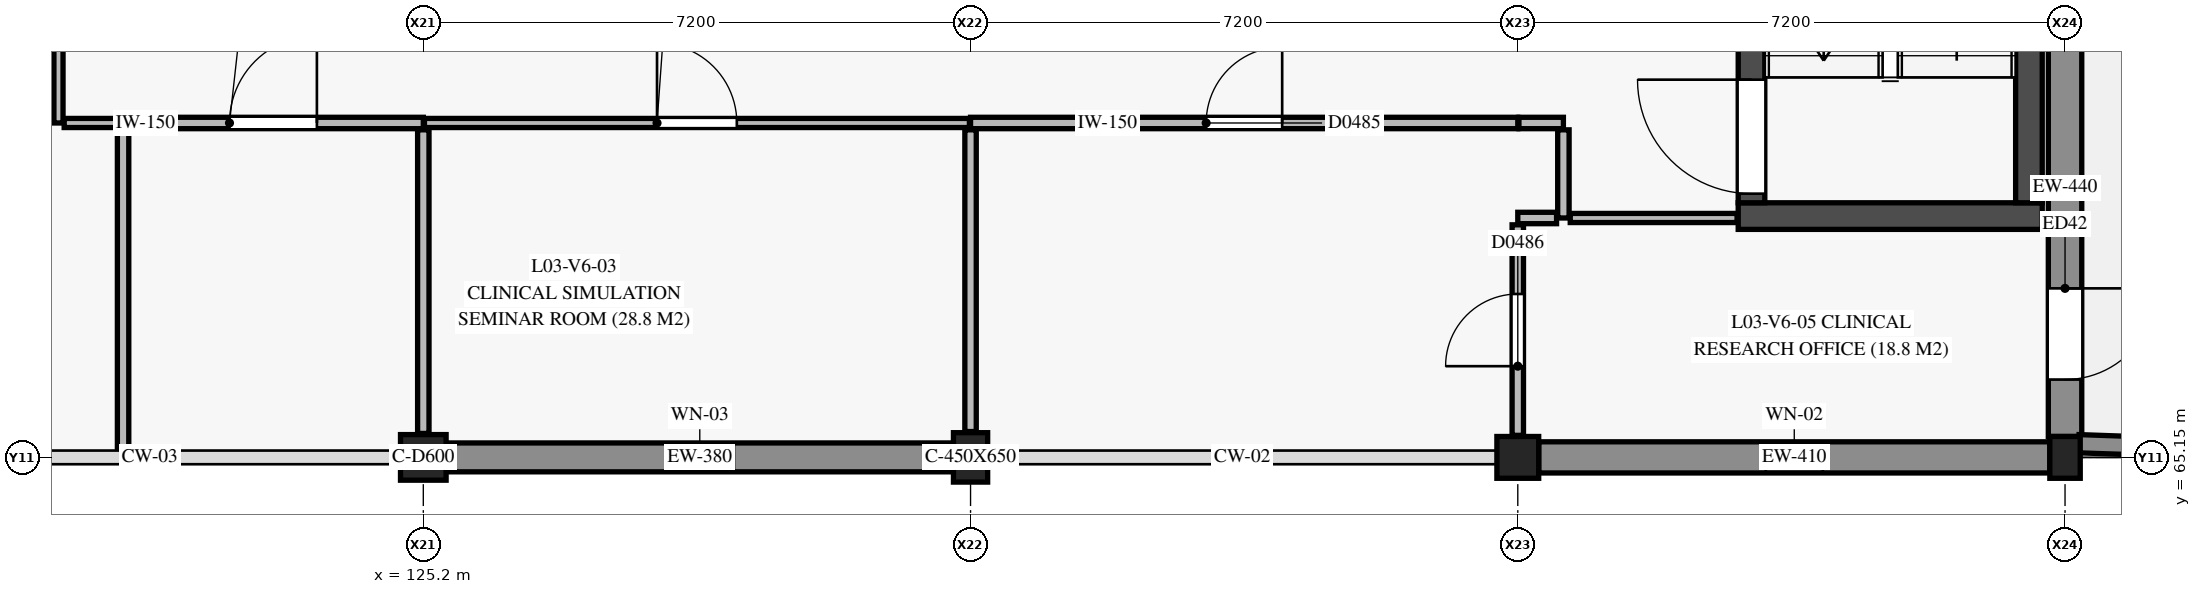
"""IFC4 building model, lengths in metres.
Left out: names, types, materials, properties, quantities, classifications, styles, units other than length and angle.
Written with IfcOpenShell. Run it as: python <this file> out.ifc"""

import sys

from ifc_helpers import new_model, si_unit, direction, frame, frame_2d, origin, origin_2d, place, context, subcontext, project, spatial, rectangle, circle, extrude, element, fill, save


model = new_model("IFC4")
c1 = context("Model", 3, precision=1e-05, world=origin(), true_north=direction((0.0, 1.0)))
c2 = subcontext(c1, "Body", "Model", "MODEL_VIEW")
j1 = project(units=[si_unit("LENGTHUNIT", "METRE"), si_unit("PLANEANGLEUNIT", "RADIAN")], contexts=[c1])
p1 = place(None, origin())
s1 = spatial("IfcSite", under=j1, at=p1, CompositionType="ELEMENT")
p2 = place(p1, origin())
s2 = spatial("IfcBuilding", under=s1, at=p2, CompositionType="ELEMENT")
p3 = place(p2, frame((0.0, 0.0, 13.2)))
s3 = spatial("IfcBuildingStorey", under=s2, at=p3, CompositionType="ELEMENT", Elevation=13.2)
p4 = place(p3, frame((125.2, 65.15, 0.0), z_axis=(0.0, 0.0, 1.0), x_axis=(1.0, 0.0, 0.0)))
e1 = element("IfcColumn", 1, at=p4, inside=s3, PredefinedType="COLUMN", context=c2, shape_type="SweptSolid", body=[
    extrude(circle(Radius=0.3, at=origin_2d()), origin(), (0.0, 0.0, 1.0), 4.05),
])
p5 = place(p3, frame((132.4, 65.15, 0.0), z_axis=(0.0, 0.0, 1.0), x_axis=(1.0, 0.0, 0.0)))
e2 = element("IfcColumn", 2, at=p5, inside=s3, PredefinedType="COLUMN", context=c2, shape_type="SweptSolid", body=[
    extrude(rectangle(XDim=0.45, YDim=0.65, at=origin_2d()), origin(), (0.0, 0.0, 1.0), 4.05),
])
p6 = place(p3, frame((139.6, 65.15, 0.0), z_axis=(0.0, 0.0, 1.0), x_axis=(1.0, 0.0, 0.0)))
e3 = element("IfcColumn", 3, at=p6, inside=s3, PredefinedType="COLUMN", context=c2, shape_type="SweptSolid", body=[
    extrude(rectangle(XDim=0.55, YDim=0.55, at=origin_2d()), origin(), (0.0, 0.0, 1.0), 4.05),
])
p7 = place(p3, frame((146.8, 65.15, 0.0), z_axis=(0.0, 0.0, 1.0), x_axis=(1.0, 0.0, 0.0)))
e4 = element("IfcColumn", 4, at=p7, inside=s3, PredefinedType="COLUMN", context=c2, shape_type="SweptSolid", body=[
    extrude(rectangle(XDim=0.4, YDim=0.55, at=origin_2d()), origin(), (0.0, 0.0, 1.0), 4.05),
])
p8 = place(p3, frame((142.5, 68.325, 0.0), z_axis=(0.0, 0.0, 1.0), x_axis=(1.0, 0.0, 0.0)))
e5 = element("IfcWall", 5, at=p8, inside=s3, PredefinedType="SHEAR", context=c2, shape_type="SweptSolid", body=[
    extrude(rectangle(XDim=4.0, YDim=0.35, at=frame_2d((2.0, 0.0))), origin(), (0.0, 0.0, 1.0), 3.95),
])
p9 = place(p3, frame((142.675, 68.5, 0.0), z_axis=(0.0, 0.0, 1.0), x_axis=(0.0, 1.0, 0.0)))
e6 = element("IfcWall", 6, at=p9, inside=s3, PredefinedType="SHEAR", context=c2, shape_type="SweptSolid", body=[
    extrude(rectangle(XDim=7.3, YDim=0.35, at=frame_2d((3.65, 0.0))), origin(), (0.0, 0.0, 1.0), 3.95),
])
p10 = place(p9, frame((0.12, 0.0, 0.0)))
e7 = element("IfcOpeningElement", 7, at=p10, cuts=e6, PredefinedType="OPENING", context=c2, shape_type="SweptSolid", body=[
    extrude(rectangle(XDim=1.5, YDim=2.15, at=frame_2d((0.75, 1.075))), frame((0.0, 0.185, 0.0), z_axis=(0.0, -1.0, 0.0), x_axis=(1.0, 0.0, 0.0)), (0.0, 0.0, 1.0), 0.37),
])
p11 = place(p3, frame((146.325, 68.5, 0.0), z_axis=(0.0, 0.0, 1.0), x_axis=(0.0, 1.0, 0.0)))
e8 = element("IfcWall", 8, at=p11, inside=s3, PredefinedType="SHEAR", context=c2, shape_type="SweptSolid", body=[
    extrude(rectangle(XDim=7.3, YDim=0.35, at=frame_2d((3.65, 0.0))), origin(), (0.0, 0.0, 1.0), 3.95),
])
p12 = place(p3, frame((146.6, 65.15, 0.0), z_axis=(0.0, 0.0, 1.0), x_axis=(-1.0, 0.0, 0.0)))
e9 = element("IfcWall", 9, at=p12, inside=s3, PredefinedType="USERDEFINED", context=c2, shape_type="SweptSolid", body=[
    extrude(rectangle(XDim=6.725, YDim=0.41, at=frame_2d((3.363, 0.0))), origin(), (0.0, 0.0, 1.0), 3.13),
])
p13 = place(p12, frame((2.988, 0.0, 0.9)))
e10 = element("IfcOpeningElement", 10, at=p13, cuts=e9, PredefinedType="OPENING", context=c2, shape_type="SweptSolid", body=[
    extrude(rectangle(XDim=0.75, YDim=1.8, at=frame_2d((0.375, 0.9))), frame((0.0, 0.215, 0.0), z_axis=(0.0, -1.0, 0.0), x_axis=(1.0, 0.0, 0.0)), (0.0, 0.0, 1.0), 0.43),
])
p14 = place(p3, frame((132.175, 65.15, 0.0), z_axis=(0.0, 0.0, 1.0), x_axis=(-1.0, 0.0, 0.0)))
e11 = element("IfcWall", 11, at=p14, inside=s3, PredefinedType="USERDEFINED", context=c2, shape_type="SweptSolid", body=[
    extrude(rectangle(XDim=6.675, YDim=0.38, at=frame_2d((3.337, 0.0))), origin(), (0.0, 0.0, 1.0), 3.13),
])
p15 = place(p14, frame((2.887, 0.0, 0.9)))
e12 = element("IfcOpeningElement", 12, at=p15, cuts=e11, PredefinedType="OPENING", context=c2, shape_type="SweptSolid", body=[
    extrude(rectangle(XDim=0.9, YDim=1.8, at=frame_2d((0.45, 0.9))), frame((0.0, 0.2, 0.0), z_axis=(0.0, -1.0, 0.0), x_axis=(1.0, 0.0, 0.0)), (0.0, 0.0, 1.0), 0.4),
])
p16 = place(p3, frame((146.8, 71.975, 0.0), z_axis=(0.0, 0.0, 1.0), x_axis=(0.0, -1.0, 0.0)))
e13 = element("IfcWall", 13, at=p16, inside=s3, PredefinedType="USERDEFINED", context=c2, shape_type="SweptSolid", body=[
    extrude(rectangle(XDim=6.55, YDim=0.44, at=frame_2d((3.275, 0.0))), origin(), (0.0, 0.0, 1.0), 3.13),
])
p17 = place(p16, frame((4.601, 0.0, 0.0)))
e14 = element("IfcOpeningElement", 14, at=p17, cuts=e13, PredefinedType="OPENING", context=c2, shape_type="SweptSolid", body=[
    extrude(rectangle(XDim=1.2, YDim=2.2, at=frame_2d((0.6, 1.1))), frame((0.0, 0.23, 0.0), z_axis=(0.0, -1.0, 0.0), x_axis=(1.0, 0.0, 0.0)), (0.0, 0.0, 1.0), 0.46),
])
p18 = place(p3, frame((146.98, 65.33, 0.0), z_axis=(0.0, 0.0, 1.0), x_axis=(0.999385059583, -0.035064265038, 0.0)))
e15 = element("IfcWall", 15, at=p18, inside=s3, PredefinedType="PARAPET", context=c2, shape_type="SweptSolid", body=[
    extrude(rectangle(XDim=6.844, YDim=0.24, at=frame_2d((3.422, 0.0))), origin(), (0.0, 0.0, 1.0), 1.12),
])
p19 = place(p3, frame((121.25, 69.55, 0.0), z_axis=(0.0, 0.0, 1.0), x_axis=(1.0, 0.0, 0.0)))
e16 = element("IfcWall", 16, at=p19, inside=s3, PredefinedType="PARTITIONING", context=c2, shape_type="SweptSolid", body=[
    extrude(rectangle(XDim=3.95, YDim=0.15, at=frame_2d((1.975, 0.0))), origin(), (0.0, 0.0, 1.0), 3.135),
])
p20 = place(p19, frame((1.4, 0.0, 0.0)))
e17 = element("IfcOpeningElement", 17, at=p20, cuts=e16, PredefinedType="OPENING", context=c2, shape_type="SweptSolid", body=[
    extrude(rectangle(XDim=1.15, YDim=2.15, at=frame_2d((0.575, 1.075))), frame((0.0, 0.085, 0.0), z_axis=(0.0, -1.0, 0.0), x_axis=(1.0, 0.0, 0.0)), (0.0, 0.0, 1.0), 0.17),
])
p21 = place(p3, frame((132.4, 69.55, 0.0), z_axis=(0.0, 0.0, 1.0), x_axis=(1.0, 0.0, 0.0)))
e18 = element("IfcWall", 18, at=p21, inside=s3, PredefinedType="PARTITIONING", context=c2, shape_type="SweptSolid", body=[
    extrude(rectangle(XDim=7.2, YDim=0.15, at=frame_2d((3.6, 0.0))), origin(), (0.0, 0.0, 1.0), 3.235),
])
p22 = place(p21, frame((3.1, 0.0, 0.0)))
e19 = element("IfcOpeningElement", 19, at=p22, cuts=e18, PredefinedType="OPENING", context=c2, shape_type="SweptSolid", body=[
    extrude(rectangle(XDim=1.0, YDim=2.15, at=frame_2d((0.5, 1.075))), frame((0.0, 0.085, 0.0), z_axis=(0.0, -1.0, 0.0), x_axis=(1.0, 0.0, 0.0)), (0.0, 0.0, 1.0), 0.17),
])
p23 = place(p3, frame((139.615, 69.55, 0.0), z_axis=(0.0, 0.0, 1.0), x_axis=(1.0, 0.0, 0.0)))
e20 = element("IfcWall", 20, at=p23, inside=s3, PredefinedType="PARTITIONING", context=c2, shape_type="SweptSolid", body=[
    extrude(rectangle(XDim=0.585, YDim=0.15, at=frame_2d((0.292, 0.0))), origin(), (0.0, 0.0, 1.0), 3.235),
])
p24 = place(p3, frame((140.2, 68.3, 0.0), z_axis=(0.0, 0.0, 1.0), x_axis=(0.0, 1.0, 0.0)))
e21 = element("IfcWall", 21, at=p24, inside=s3, PredefinedType="PARTITIONING", context=c2, shape_type="SweptSolid", body=[
    extrude(rectangle(XDim=1.16, YDim=0.15, at=frame_2d((0.58, 0.0))), origin(), (0.0, 0.0, 1.0), 3.95),
])
p25 = place(p3, frame((139.6, 68.3, 0.0), z_axis=(0.0, 0.0, 1.0), x_axis=(1.0, 0.0, 0.0)))
e22 = element("IfcWall", 22, at=p25, inside=s3, PredefinedType="PARTITIONING", context=c2, shape_type="SweptSolid", body=[
    extrude(rectangle(XDim=0.51, YDim=0.15, at=frame_2d((0.255, 0.0))), origin(), (0.0, 0.0, 1.0), 3.235),
])
p26 = place(p3, frame((120.4, 69.55, 0.0), z_axis=(0.0, 0.0, 1.0), x_axis=(0.0, 1.0, 0.0)))
e23 = element("IfcWall", 23, at=p26, inside=s3, PredefinedType="PARTITIONING", context=c2, shape_type="SweptSolid", body=[
    extrude(rectangle(XDim=17.535, YDim=0.12, at=frame_2d((8.768, 0.0))), origin(), (0.0, 0.0, 1.0), 3.285),
])
p27 = place(p26, frame((8.143, 0.0, 0.0)))
e24 = element("IfcOpeningElement", 24, at=p27, cuts=e23, PredefinedType="OPENING", context=c2, shape_type="SweptSolid", body=[
    extrude(rectangle(XDim=1.25, YDim=2.15, at=frame_2d((0.625, 1.075))), frame((0.0, 0.07, 0.0), z_axis=(0.0, -1.0, 0.0), x_axis=(1.0, 0.0, 0.0)), (0.0, 0.0, 1.0), 0.14),
])
p28 = place(p3, frame((120.475, 69.55, 0.0), z_axis=(0.0, 0.0, 1.0), x_axis=(1.0, 0.0, 0.0)))
e25 = element("IfcWall", 25, at=p28, inside=s3, PredefinedType="PARTITIONING", context=c2, shape_type="SweptSolid", body=[
    extrude(rectangle(XDim=0.76, YDim=0.12, at=frame_2d((0.38, 0.0))), origin(), (0.0, 0.0, 1.0), 3.95),
])
p29 = place(p3, frame((125.215, 69.55, 0.0), z_axis=(0.0, 0.0, 1.0), x_axis=(1.0, 0.0, 0.0)))
e26 = element("IfcWall", 26, at=p29, inside=s3, PredefinedType="PARTITIONING", context=c2, shape_type="SweptSolid", body=[
    extrude(rectangle(XDim=7.17, YDim=0.12, at=frame_2d((3.585, 0.0))), origin(), (0.0, 0.0, 1.0), 3.135),
])
p30 = place(p29, frame((3.06, 0.0, 0.0)))
e27 = element("IfcOpeningElement", 27, at=p30, cuts=e26, PredefinedType="OPENING", context=c2, shape_type="SweptSolid", body=[
    extrude(rectangle(XDim=1.05, YDim=2.15, at=frame_2d((0.525, 1.075))), frame((0.0, 0.07, 0.0), z_axis=(0.0, -1.0, 0.0), x_axis=(1.0, 0.0, 0.0)), (0.0, 0.0, 1.0), 0.14),
])
p31 = place(p3, frame((140.29, 68.3, 0.0), z_axis=(0.0, 0.0, 1.0), x_axis=(1.0, 0.0, 0.0)))
e28 = element("IfcWall", 28, at=p31, inside=s3, PredefinedType="PARTITIONING", context=c2, shape_type="SweptSolid", body=[
    extrude(rectangle(XDim=2.195, YDim=0.12, at=frame_2d((1.098, 0.0))), origin(), (0.0, 0.0, 1.0), 3.95),
])
p32 = place(p3, frame((121.25, 65.255, 0.0), z_axis=(0.0, 0.0, 1.0), x_axis=(0.0, 1.0, 0.0)))
e29 = element("IfcWall", 29, at=p32, inside=s3, PredefinedType="PARTITIONING", context=c2, shape_type="SweptSolid", body=[
    extrude(rectangle(XDim=4.205, YDim=0.15, at=frame_2d((2.103, 0.0))), origin(), (0.0, 0.0, 1.0), 3.515),
])
p33 = place(p3, frame((125.2, 65.465, 0.0), z_axis=(0.0, 0.0, 1.0), x_axis=(0.0, 1.0, 0.0)))
e30 = element("IfcWall", 30, at=p33, inside=s3, PredefinedType="PARTITIONING", context=c2, shape_type="SweptSolid", body=[
    extrude(rectangle(XDim=3.995, YDim=0.15, at=frame_2d((1.998, 0.0))), origin(), (0.0, 0.0, 1.0), 3.135),
])
p34 = place(p3, frame((132.4, 65.49, 0.0), z_axis=(0.0, 0.0, 1.0), x_axis=(0.0, 1.0, 0.0)))
e31 = element("IfcWall", 31, at=p34, inside=s3, PredefinedType="PARTITIONING", context=c2, shape_type="SweptSolid", body=[
    extrude(rectangle(XDim=3.97, YDim=0.15, at=frame_2d((1.985, 0.0))), origin(), (0.0, 0.0, 1.0), 3.355),
])
p35 = place(p3, frame((139.6, 65.44, 0.0), z_axis=(0.0, 0.0, 1.0), x_axis=(0.0, 1.0, 0.0)))
e32 = element("IfcWall", 32, at=p35, inside=s3, PredefinedType="PARTITIONING", context=c2, shape_type="SweptSolid", body=[
    extrude(rectangle(XDim=2.77, YDim=0.15, at=frame_2d((1.385, 0.0))), origin(), (0.0, 0.0, 1.0), 3.235),
])
p36 = place(p35, frame((0.91, 0.0, 0.0)))
e33 = element("IfcOpeningElement", 33, at=p36, cuts=e32, PredefinedType="OPENING", context=c2, shape_type="SweptSolid", body=[
    extrude(rectangle(XDim=0.95, YDim=2.1, at=frame_2d((0.475, 1.05))), frame((0.0, 0.085, 0.0), z_axis=(0.0, -1.0, 0.0), x_axis=(1.0, 0.0, 0.0)), (0.0, 0.0, 1.0), 0.17),
])
p37 = place(p13, origin())
e34 = element("IfcWindow", 34, at=p37, inside=s3, PartitioningType="SINGLE_PANEL", PredefinedType="WINDOW", context=c2, shape_type="SweptSolid", body=[
    extrude(rectangle(XDim=0.75, YDim=1.8, at=frame_2d((0.375, 0.9))), frame((0.0, 0.03, 0.0), z_axis=(0.0, -1.0, 0.0), x_axis=(1.0, 0.0, 0.0)), (0.0, 0.0, 1.0), 0.06),
])
fill(e10, e34)
p38 = place(p15, origin())
e35 = element("IfcWindow", 35, at=p38, inside=s3, PartitioningType="SINGLE_PANEL", PredefinedType="WINDOW", context=c2, shape_type="SweptSolid", body=[
    extrude(rectangle(XDim=0.9, YDim=1.8, at=frame_2d((0.45, 0.9))), frame((0.0, 0.03, 0.0), z_axis=(0.0, -1.0, 0.0), x_axis=(1.0, 0.0, 0.0)), (0.0, 0.0, 1.0), 0.06),
])
fill(e12, e35)
p39 = place(p17, origin())
e36 = element("IfcDoor", 36, at=p39, inside=s3, OperationType="SINGLE_SWING_LEFT", PredefinedType="DOOR", context=c2, shape_type="SweptSolid", body=[
    extrude(rectangle(XDim=1.2, YDim=2.2, at=frame_2d((0.6, 1.1))), frame((0.0, 0.025, 0.0), z_axis=(0.0, -1.0, 0.0), x_axis=(1.0, 0.0, 0.0)), (0.0, 0.0, 1.0), 0.05),
])
fill(e14, e36)
p40 = place(p10, origin())
e37 = element("IfcDoor", 37, at=p40, inside=s3, OperationType="SINGLE_SWING_RIGHT", PredefinedType="DOOR", context=c2, shape_type="SweptSolid", body=[
    extrude(rectangle(XDim=1.5, YDim=2.15, at=frame_2d((0.75, 1.075))), frame((0.0, 0.025, 0.0), z_axis=(0.0, -1.0, 0.0), x_axis=(1.0, 0.0, 0.0)), (0.0, 0.0, 1.0), 0.05),
])
fill(e7, e37)
p41 = place(p20, origin())
e38 = element("IfcDoor", 38, at=p41, inside=s3, OperationType="SINGLE_SWING_RIGHT", PredefinedType="DOOR", context=c2, shape_type="SweptSolid", body=[
    extrude(rectangle(XDim=1.15, YDim=2.15, at=frame_2d((0.575, 1.075))), frame((0.0, 0.025, 0.0), z_axis=(0.0, -1.0, 0.0), x_axis=(1.0, 0.0, 0.0)), (0.0, 0.0, 1.0), 0.05),
])
fill(e17, e38)
p42 = place(p30, origin())
e39 = element("IfcDoor", 39, at=p42, inside=s3, OperationType="SINGLE_SWING_LEFT", PredefinedType="DOOR", context=c2, shape_type="SweptSolid", body=[
    extrude(rectangle(XDim=1.05, YDim=2.15, at=frame_2d((0.525, 1.075))), frame((0.0, 0.025, 0.0), z_axis=(0.0, -1.0, 0.0), x_axis=(1.0, 0.0, 0.0)), (0.0, 0.0, 1.0), 0.05),
])
fill(e27, e39)
p43 = place(p22, origin())
e40 = element("IfcDoor", 40, at=p43, inside=s3, OperationType="SINGLE_SWING_RIGHT", PredefinedType="DOOR", context=c2, shape_type="SweptSolid", body=[
    extrude(rectangle(XDim=1.0, YDim=2.15, at=frame_2d((0.5, 1.075))), frame((0.0, 0.025, 0.0), z_axis=(0.0, -1.0, 0.0), x_axis=(1.0, 0.0, 0.0)), (0.0, 0.0, 1.0), 0.05),
])
fill(e19, e40)
p44 = place(p36, origin())
e41 = element("IfcDoor", 41, at=p44, inside=s3, OperationType="SINGLE_SWING_LEFT", PredefinedType="DOOR", context=c2, shape_type="SweptSolid", body=[
    extrude(rectangle(XDim=0.95, YDim=2.1, at=frame_2d((0.475, 1.05))), frame((0.0, 0.025, 0.0), z_axis=(0.0, -1.0, 0.0), x_axis=(1.0, 0.0, 0.0)), (0.0, 0.0, 1.0), 0.05),
])
fill(e33, e41)
save(model, sys.argv[1])
